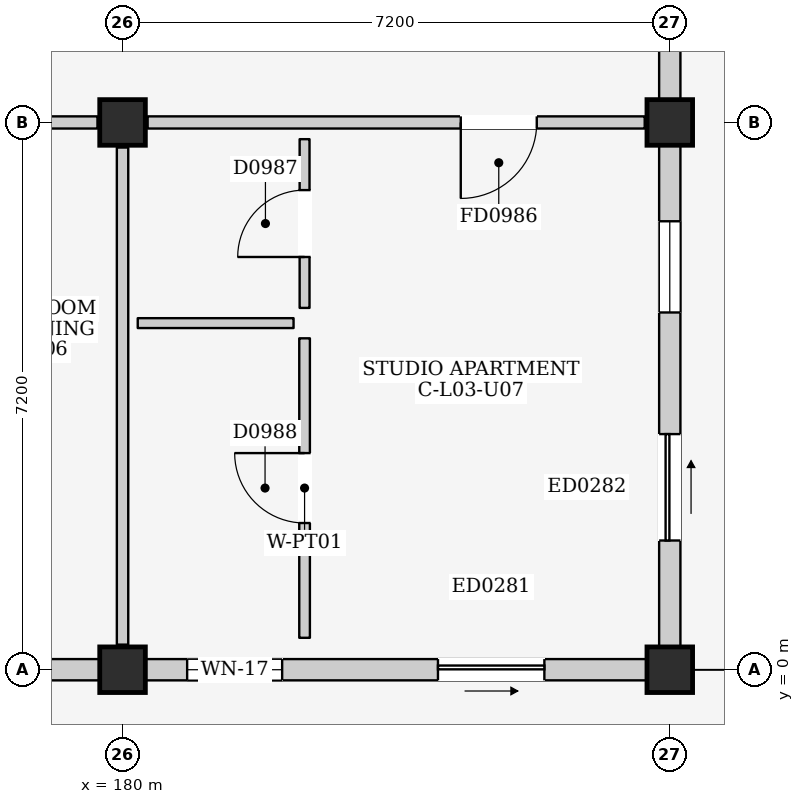
"""IFC4 building model, lengths in metres.
Left out: names, types, materials, properties, quantities, classifications, styles, units other than length and angle.
Written with IfcOpenShell. Run it as: python <this file> out.ifc"""

import sys

from ifc_helpers import new_model, si_unit, direction, frame, frame_2d, origin, origin_2d, place, context, subcontext, project, spatial, rectangle, extrude, element, fill, save


model = new_model("IFC4")
c1 = context("Model", 3, precision=1e-05, world=origin(), true_north=direction((0.0, 1.0)))
c2 = subcontext(c1, "Body", "Model", "MODEL_VIEW")
j1 = project(units=[si_unit("LENGTHUNIT", "METRE"), si_unit("PLANEANGLEUNIT", "RADIAN")], contexts=[c1])
p1 = place(None, origin())
s1 = spatial("IfcSite", under=j1, at=p1, CompositionType="ELEMENT")
p2 = place(p1, origin())
s2 = spatial("IfcBuilding", under=s1, at=p2, CompositionType="ELEMENT")
p3 = place(p2, frame((0.0, 0.0, 12.2)))
s3 = spatial("IfcBuildingStorey", under=s2, at=p3, CompositionType="ELEMENT", Elevation=12.2)
for number, where, z_axis, x_axis in (
    (1, (180.0, 0.0, 0.0), (0.0, 0.0, 1.0), (1.0, 0.0, 0.0)),
    (2, (180.0, 7.2, 0.0), (0.0, 0.0, 1.0), (1.0, 0.0, 0.0)),
    (3, (187.2, 0.0, 0.0), (0.0, 0.0, 1.0), (1.0, 0.0, 0.0)),
    (4, (187.2, 7.2, 0.0), (0.0, 0.0, 1.0), (1.0, 0.0, 0.0)),
):
    element("IfcColumn", number, at=place(p3, frame(where, z_axis=z_axis, x_axis=x_axis)), inside=s3, PredefinedType="COLUMN", context=c2, shape_type="SweptSolid", body=[
        extrude(rectangle(XDim=0.6, YDim=0.6, at=origin_2d()), origin(), (0.0, 0.0, 1.0), 3.2),
    ])
p4 = place(p3, frame((173.1, 0.0, 0.0), z_axis=(0.0, 0.0, 1.0), x_axis=(1.0, 0.0, 0.0)))
e5 = element("IfcWall", 5, at=p4, inside=s3, PredefinedType="ELEMENTEDWALL", context=c2, shape_type="SweptSolid", body=[
    extrude(rectangle(XDim=6.6, YDim=0.28, at=frame_2d((3.3, 0.0))), origin(), (0.0, 0.0, 1.0), 2.445),
])
p5 = place(p4, frame((3.85, 0.0, 0.0)))
e6 = element("IfcOpeningElement", 6, at=p5, cuts=e5, PredefinedType="OPENING", context=c2, shape_type="SweptSolid", body=[
    extrude(rectangle(XDim=2.0, YDim=2.12, at=frame_2d((1.0, 1.06))), frame((0.0, 0.155, 0.0), z_axis=(0.0, -1.0, 0.0), x_axis=(1.0, 0.0, 0.0)), (0.0, 0.0, 1.0), 0.31),
])
p6 = place(p4, frame((0.55, 0.0, 0.9)))
e7 = element("IfcOpeningElement", 7, at=p6, cuts=e5, PredefinedType="OPENING", context=c2, shape_type="SweptSolid", body=[
    extrude(rectangle(XDim=1.45, YDim=1.4, at=frame_2d((0.725, 0.7))), frame((0.0, 0.155, 0.0), z_axis=(0.0, -1.0, 0.0), x_axis=(1.0, 0.0, 0.0)), (0.0, 0.0, 1.0), 0.31),
])
p7 = place(p3, frame((180.3, 0.0, 0.0), z_axis=(0.0, 0.0, 1.0), x_axis=(1.0, 0.0, 0.0)))
e8 = element("IfcWall", 8, at=p7, inside=s3, PredefinedType="ELEMENTEDWALL", context=c2, shape_type="SweptSolid", body=[
    extrude(rectangle(XDim=6.6, YDim=0.28, at=frame_2d((3.3, 0.0))), origin(), (0.0, 0.0, 1.0), 2.445),
])
p8 = place(p7, frame((3.85, 0.0, 0.0)))
e9 = element("IfcOpeningElement", 9, at=p8, cuts=e8, PredefinedType="OPENING", context=c2, shape_type="SweptSolid", body=[
    extrude(rectangle(XDim=1.4, YDim=2.1, at=frame_2d((0.7, 1.05))), frame((0.0, 0.155, 0.0), z_axis=(0.0, -1.0, 0.0), x_axis=(1.0, 0.0, 0.0)), (0.0, 0.0, 1.0), 0.31),
])
p9 = place(p7, frame((0.55, 0.0, 0.9)))
e10 = element("IfcOpeningElement", 10, at=p9, cuts=e8, PredefinedType="OPENING", context=c2, shape_type="SweptSolid", body=[
    extrude(rectangle(XDim=1.25, YDim=1.3, at=frame_2d((0.625, 0.65))), frame((0.0, 0.155, 0.0), z_axis=(0.0, -1.0, 0.0), x_axis=(1.0, 0.0, 0.0)), (0.0, 0.0, 1.0), 0.31),
])
p10 = place(p3, frame((187.2, 0.3, 0.0), z_axis=(0.0, 0.0, 1.0), x_axis=(0.0, 1.0, 0.0)))
e11 = element("IfcWall", 11, at=p10, inside=s3, PredefinedType="ELEMENTEDWALL", context=c2, shape_type="SweptSolid", body=[
    extrude(rectangle(XDim=6.6, YDim=0.28, at=frame_2d((3.3, 0.0))), origin(), (0.0, 0.0, 1.0), 2.445),
])
p11 = place(p10, frame((1.4, 0.0, 0.0)))
e12 = element("IfcOpeningElement", 12, at=p11, cuts=e11, PredefinedType="OPENING", context=c2, shape_type="SweptSolid", body=[
    extrude(rectangle(XDim=1.4, YDim=2.1, at=frame_2d((0.7, 1.05))), frame((0.0, 0.155, 0.0), z_axis=(0.0, -1.0, 0.0), x_axis=(1.0, 0.0, 0.0)), (0.0, 0.0, 1.0), 0.31),
])
p12 = place(p10, frame((4.4, 0.0, 0.95)))
e13 = element("IfcOpeningElement", 13, at=p12, cuts=e11, PredefinedType="OPENING", context=c2, shape_type="SweptSolid", body=[
    extrude(rectangle(XDim=1.2, YDim=1.35, at=frame_2d((0.6, 0.675))), frame((0.0, 0.155, 0.0), z_axis=(0.0, -1.0, 0.0), x_axis=(1.0, 0.0, 0.0)), (0.0, 0.0, 1.0), 0.31),
])
p13 = place(p3, frame((187.2, 7.5, 0.0), z_axis=(0.0, 0.0, 1.0), x_axis=(0.0, 1.0, 0.0)))
e14 = element("IfcWall", 14, at=p13, inside=s3, PredefinedType="ELEMENTEDWALL", context=c2, shape_type="SweptSolid", body=[
    extrude(rectangle(XDim=6.6, YDim=0.28, at=frame_2d((3.3, 0.0))), origin(), (0.0, 0.0, 1.0), 2.445),
])
p14 = place(p13, frame((3.65, 0.0, 0.0)))
e15 = element("IfcOpeningElement", 15, at=p14, cuts=e14, PredefinedType="OPENING", context=c2, shape_type="SweptSolid", body=[
    extrude(rectangle(XDim=1.4, YDim=2.1, at=frame_2d((0.7, 1.05))), frame((0.0, 0.155, 0.0), z_axis=(0.0, -1.0, 0.0), x_axis=(1.0, 0.0, 0.0)), (0.0, 0.0, 1.0), 0.31),
])
p15 = place(p3, frame((173.13, 7.2, 0.0), z_axis=(0.0, 0.0, 1.0), x_axis=(1.0, 0.0, 0.0)))
e16 = element("IfcWall", 16, at=p15, inside=s3, PredefinedType="PARTITIONING", context=c2, shape_type="SweptSolid", body=[
    extrude(rectangle(XDim=6.54, YDim=0.16, at=frame_2d((3.27, 0.0))), origin(), (0.0, 0.0, 1.0), 2.365),
])
p16 = place(p15, frame((4.82, 0.0, 0.0)))
e17 = element("IfcOpeningElement", 17, at=p16, cuts=e16, PredefinedType="OPENING", context=c2, shape_type="SweptSolid", body=[
    extrude(rectangle(XDim=1.0, YDim=2.15, at=frame_2d((0.5, 1.075))), frame((0.0, 0.095, 0.0), z_axis=(0.0, -1.0, 0.0), x_axis=(1.0, 0.0, 0.0)), (0.0, 0.0, 1.0), 0.19),
])
p17 = place(p3, frame((180.0, 0.33, 0.0), z_axis=(0.0, 0.0, 1.0), x_axis=(0.0, 1.0, 0.0)))
e18 = element("IfcWall", 18, at=p17, inside=s3, PredefinedType="PARTITIONING", context=c2, shape_type="SweptSolid", body=[
    extrude(rectangle(XDim=6.54, YDim=0.15, at=frame_2d((3.27, 0.0))), origin(), (0.0, 0.0, 1.0), 2.415),
])
p18 = place(p3, frame((180.33, 7.2, 0.0), z_axis=(0.0, 0.0, 1.0), x_axis=(1.0, 0.0, 0.0)))
e19 = element("IfcWall", 19, at=p18, inside=s3, PredefinedType="PARTITIONING", context=c2, shape_type="SweptSolid", body=[
    extrude(rectangle(XDim=6.54, YDim=0.16, at=frame_2d((3.27, 0.0))), origin(), (0.0, 0.0, 1.0), 2.365),
])
p19 = place(p18, frame((4.12, 0.0, 0.0)))
e20 = element("IfcOpeningElement", 20, at=p19, cuts=e19, PredefinedType="OPENING", context=c2, shape_type="SweptSolid", body=[
    extrude(rectangle(XDim=1.0, YDim=2.15, at=frame_2d((0.5, 1.075))), frame((0.0, 0.095, 0.0), z_axis=(0.0, -1.0, 0.0), x_axis=(1.0, 0.0, 0.0)), (0.0, 0.0, 1.0), 0.19),
])
p20 = place(p3, frame((180.2, 4.56, 0.0), z_axis=(0.0, 0.0, 1.0), x_axis=(1.0, 0.0, 0.0)))
e21 = element("IfcWall", 21, at=p20, inside=s3, PredefinedType="PARTITIONING", context=c2, shape_type="SweptSolid", body=[
    extrude(rectangle(XDim=2.05, YDim=0.13, at=frame_2d((1.025, 0.0))), origin(), (0.0, 0.0, 1.0), 2.98),
])
p21 = place(p3, frame((182.395, 4.76, 0.0), z_axis=(0.0, 0.0, 1.0), x_axis=(0.0, 1.0, 0.0)))
e22 = element("IfcWall", 22, at=p21, inside=s3, PredefinedType="PARTITIONING", context=c2, shape_type="SweptSolid", body=[
    extrude(rectangle(XDim=2.22, YDim=0.13, at=frame_2d((1.11, 0.0))), origin(), (0.0, 0.0, 1.0), 2.98),
])
p22 = place(p21, frame((0.67, 0.0, 0.0)))
e23 = element("IfcOpeningElement", 23, at=p22, cuts=e22, PredefinedType="OPENING", context=c2, shape_type="SweptSolid", body=[
    extrude(rectangle(XDim=0.88, YDim=2.1, at=frame_2d((0.44, 1.05))), frame((0.0, 0.08, 0.0), z_axis=(0.0, -1.0, 0.0), x_axis=(1.0, 0.0, 0.0)), (0.0, 0.0, 1.0), 0.16),
])
p23 = place(p3, frame((182.395, 0.42, 0.0), z_axis=(0.0, 0.0, 1.0), x_axis=(0.0, 1.0, 0.0)))
e24 = element("IfcWall", 24, at=p23, inside=s3, PredefinedType="PARTITIONING", context=c2, shape_type="SweptSolid", body=[
    extrude(rectangle(XDim=3.94, YDim=0.14, at=frame_2d((1.97, 0.0))), origin(), (0.0, 0.0, 1.0), 2.98),
])
p24 = place(p23, frame((1.51, 0.0, 0.0)))
e25 = element("IfcOpeningElement", 25, at=p24, cuts=e24, PredefinedType="OPENING", context=c2, shape_type="SweptSolid", body=[
    extrude(rectangle(XDim=0.92, YDim=2.1, at=frame_2d((0.46, 1.05))), frame((0.0, 0.085, 0.0), z_axis=(0.0, -1.0, 0.0), x_axis=(1.0, 0.0, 0.0)), (0.0, 0.0, 1.0), 0.17),
])
p25 = place(p8, frame((1.4, 0.0, 0.0), z_axis=(0.0, 0.0, 1.0), x_axis=(-1.0, 0.0, 0.0)))
e26 = element("IfcDoor", 26, at=p25, inside=s3, OperationType="SLIDING_TO_RIGHT", PredefinedType="DOOR", context=c2, shape_type="SweptSolid", body=[
    extrude(rectangle(XDim=1.4, YDim=2.1, at=frame_2d((0.7, 1.05))), frame((0.0, 0.025, 0.0), z_axis=(0.0, -1.0, 0.0), x_axis=(1.0, 0.0, 0.0)), (0.0, 0.0, 1.0), 0.05),
])
fill(e9, e26)
p26 = place(p9, origin())
e27 = element("IfcWindow", 27, at=p26, inside=s3, PartitioningType="SINGLE_PANEL", PredefinedType="WINDOW", context=c2, shape_type="SweptSolid", body=[
    extrude(rectangle(XDim=1.25, YDim=1.3, at=frame_2d((0.625, 0.65))), frame((0.0, 0.03, 0.0), z_axis=(0.0, -1.0, 0.0), x_axis=(1.0, 0.0, 0.0)), (0.0, 0.0, 1.0), 0.06),
])
fill(e10, e27)
p27 = place(p11, frame((1.4, 0.0, 0.0), z_axis=(0.0, 0.0, 1.0), x_axis=(-1.0, 0.0, 0.0)))
e28 = element("IfcDoor", 28, at=p27, inside=s3, OperationType="SLIDING_TO_RIGHT", PredefinedType="DOOR", context=c2, shape_type="SweptSolid", body=[
    extrude(rectangle(XDim=1.4, YDim=2.1, at=frame_2d((0.7, 1.05))), frame((0.0, 0.025, 0.0), z_axis=(0.0, -1.0, 0.0), x_axis=(1.0, 0.0, 0.0)), (0.0, 0.0, 1.0), 0.05),
])
fill(e12, e28)
p28 = place(p12, origin())
e29 = element("IfcWindow", 29, at=p28, inside=s3, PartitioningType="SINGLE_PANEL", PredefinedType="WINDOW", context=c2, shape_type="SweptSolid", body=[
    extrude(rectangle(XDim=1.2, YDim=1.35, at=frame_2d((0.6, 0.675))), frame((0.0, 0.03, 0.0), z_axis=(0.0, -1.0, 0.0), x_axis=(1.0, 0.0, 0.0)), (0.0, 0.0, 1.0), 0.06),
])
fill(e13, e29)
p29 = place(p19, frame((1.0, 0.0, 0.0), z_axis=(0.0, 0.0, 1.0), x_axis=(-1.0, 0.0, 0.0)))
e30 = element("IfcDoor", 30, at=p29, inside=s3, OperationType="SINGLE_SWING_RIGHT", PredefinedType="DOOR", context=c2, shape_type="SweptSolid", body=[
    extrude(rectangle(XDim=1.0, YDim=2.15, at=frame_2d((0.5, 1.075))), frame((0.0, 0.025, 0.0), z_axis=(0.0, -1.0, 0.0), x_axis=(1.0, 0.0, 0.0)), (0.0, 0.0, 1.0), 0.05),
])
fill(e20, e30)
p30 = place(p22, origin())
e31 = element("IfcDoor", 31, at=p30, inside=s3, OperationType="SINGLE_SWING_LEFT", PredefinedType="DOOR", context=c2, shape_type="SweptSolid", body=[
    extrude(rectangle(XDim=0.88, YDim=2.1, at=frame_2d((0.44, 1.05))), frame((0.0, 0.025, 0.0), z_axis=(0.0, -1.0, 0.0), x_axis=(1.0, 0.0, 0.0)), (0.0, 0.0, 1.0), 0.05),
])
fill(e23, e31)
p31 = place(p24, origin())
e32 = element("IfcDoor", 32, at=p31, inside=s3, OperationType="SINGLE_SWING_RIGHT", PredefinedType="DOOR", context=c2, shape_type="SweptSolid", body=[
    extrude(rectangle(XDim=0.92, YDim=2.1, at=frame_2d((0.46, 1.05))), frame((0.0, 0.025, 0.0), z_axis=(0.0, -1.0, 0.0), x_axis=(1.0, 0.0, 0.0)), (0.0, 0.0, 1.0), 0.05),
])
fill(e25, e32)
save(model, sys.argv[1])
